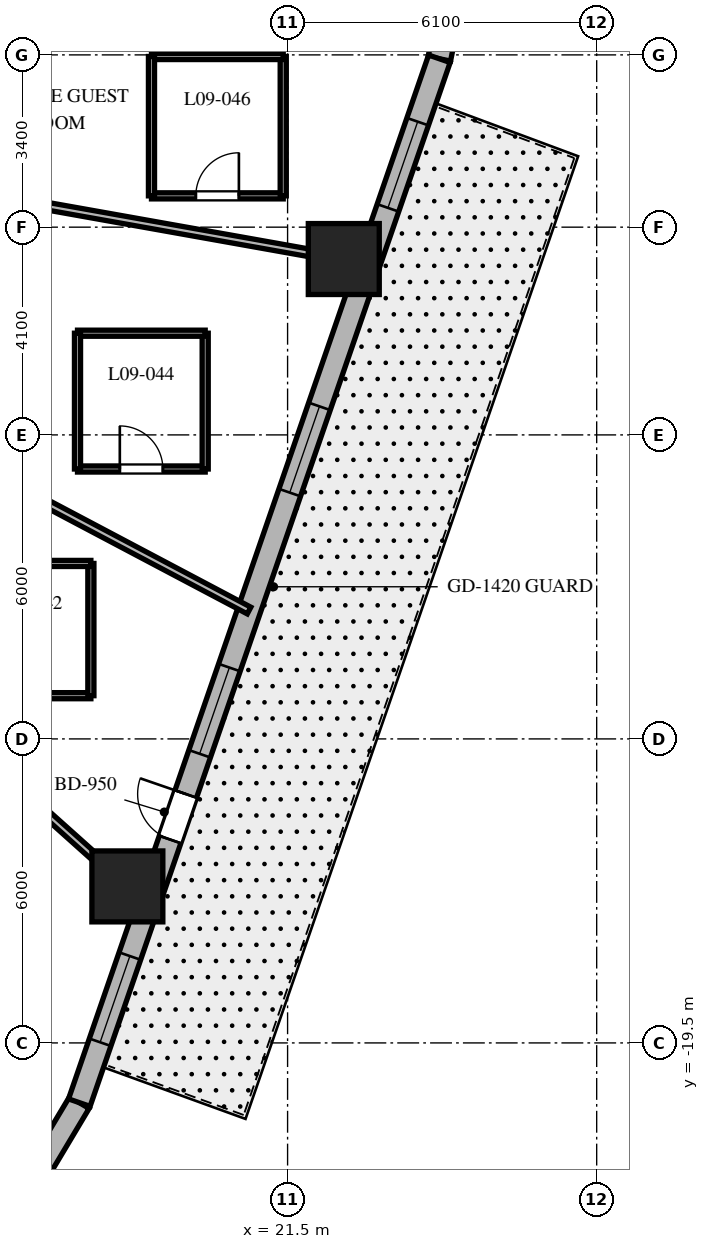
"""IFC4 building model, lengths in metres.
Left out: names, types, materials, properties, quantities, classifications, styles, units other than length and angle.
Written with IfcOpenShell. Run it as: python <this file> out.ifc"""

import sys

from ifc_helpers import new_model, si_unit, direction, frame, frame_2d, origin, origin_2d, place, context, subcontext, project, spatial, rectangle, extrude, element, fill, save


model = new_model("IFC4")
c1 = context("Model", 3, precision=1e-05, world=origin(), true_north=direction((0.0, 1.0)))
c2 = subcontext(c1, "Body", "Model", "MODEL_VIEW")
j1 = project(units=[si_unit("LENGTHUNIT", "METRE"), si_unit("PLANEANGLEUNIT", "RADIAN")], contexts=[c1])
p1 = place(None, origin())
s1 = spatial("IfcSite", under=j1, at=p1, CompositionType="ELEMENT")
p2 = place(p1, origin())
s2 = spatial("IfcBuilding", under=s1, at=p2, CompositionType="ELEMENT")
p3 = place(p2, frame((0.0, 0.0, 45.3)))
s3 = spatial("IfcBuildingStorey", under=s2, at=p3, CompositionType="ELEMENT", Elevation=45.3)
for number, where, z_axis, x_axis in (
    (1, (18.338, -16.411, 0.0), (0.0, 0.0, 1.0), (1.0, 0.0, 0.0)),
    (2, (22.609, -4.029, 0.0), (0.0, 0.0, 1.0), (1.0, 0.0, 0.0)),
):
    element("IfcColumn", number, at=place(p3, frame(where, z_axis=z_axis, x_axis=x_axis)), inside=s3, PredefinedType="COLUMN", context=c2, shape_type="SweptSolid", body=[
        extrude(rectangle(XDim=1.4, YDim=1.4, at=origin_2d()), origin(), (0.0, 0.0, 1.0), 3.7),
    ])
p4 = place(p3, frame((16.669, -21.885, 0.0), z_axis=(0.0, 0.0, 1.0), x_axis=(0.512936712947, 0.858426425799, 0.0)))
e3 = element("IfcWall", 3, at=p4, inside=s3, PredefinedType="SOLIDWALL", context=c2, shape_type="SweptSolid", body=[
    extrude(rectangle(XDim=1.406, YDim=0.45, at=frame_2d((0.703, 0.0))), origin(), (0.0, 0.0, 1.0), 3.4),
])
p5 = place(p3, frame((24.496, -0.077, 0.0), z_axis=(0.0, 0.0, 1.0), x_axis=(0.199570594521, 0.979883451132, 0.0)))
e4 = element("IfcWall", 4, at=p5, inside=s3, PredefinedType="SOLIDWALL", context=c2, shape_type="SweptSolid", body=[
    extrude(rectangle(XDim=0.897, YDim=0.45, at=frame_2d((0.448, 0.0))), origin(), (0.0, 0.0, 1.0), 3.4),
])
p6 = place(p3, frame((17.39, -20.678, 0.0), z_axis=(0.0, 0.0, 1.0), x_axis=(0.326068018294, 0.945346310854, 0.0)))
e5 = element("IfcWall", 5, at=p6, inside=s3, PredefinedType="SOLIDWALL", context=c2, shape_type="SweptSolid", body=[
    extrude(rectangle(XDim=21.793, YDim=0.45, at=frame_2d((10.896, 0.0))), origin(), (0.0, 0.0, 1.0), 3.4),
])
p7 = place(p6, frame((5.493, 0.0, 0.0)))
e6 = element("IfcOpeningElement", 6, at=p7, cuts=e5, PredefinedType="OPENING", context=c2, shape_type="SweptSolid", body=[
    extrude(rectangle(XDim=0.95, YDim=2.15, at=frame_2d((0.475, 1.075))), frame((0.0, 0.235, 0.0), z_axis=(0.0, -1.0, 0.0), x_axis=(1.0, 0.0, 0.0)), (0.0, 0.0, 1.0), 0.47),
])
p8 = place(p6, frame((1.26, 0.0, 0.8)))
e7 = element("IfcOpeningElement", 7, at=p8, cuts=e5, PredefinedType="OPENING", context=c2, shape_type="SweptSolid", body=[
    extrude(rectangle(XDim=1.8, YDim=1.8, at=frame_2d((0.9, 0.9))), frame((0.0, 0.235, 0.0), z_axis=(0.0, -1.0, 0.0), x_axis=(1.0, 0.0, 0.0)), (0.0, 0.0, 1.0), 0.47),
])
p9 = place(p6, frame((7.283, 0.0, 0.8)))
e8 = element("IfcOpeningElement", 8, at=p9, cuts=e5, PredefinedType="OPENING", context=c2, shape_type="SweptSolid", body=[
    extrude(rectangle(XDim=1.8, YDim=1.8, at=frame_2d((0.9, 0.9))), frame((0.0, 0.235, 0.0), z_axis=(0.0, -1.0, 0.0), x_axis=(1.0, 0.0, 0.0)), (0.0, 0.0, 1.0), 0.47),
])
p10 = place(p6, frame((12.736, 0.0, 0.8)))
e9 = element("IfcOpeningElement", 9, at=p10, cuts=e5, PredefinedType="OPENING", context=c2, shape_type="SweptSolid", body=[
    extrude(rectangle(XDim=1.8, YDim=1.8, at=frame_2d((0.9, 0.9))), frame((0.0, 0.235, 0.0), z_axis=(0.0, -1.0, 0.0), x_axis=(1.0, 0.0, 0.0)), (0.0, 0.0, 1.0), 0.47),
])
p11 = place(p6, frame((18.68, 0.0, 0.8)))
e10 = element("IfcOpeningElement", 10, at=p11, cuts=e5, PredefinedType="OPENING", context=c2, shape_type="SweptSolid", body=[
    extrude(rectangle(XDim=1.8, YDim=1.8, at=frame_2d((0.9, 0.9))), frame((0.0, 0.235, 0.0), z_axis=(0.0, -1.0, 0.0), x_axis=(1.0, 0.0, 0.0)), (0.0, 0.0, 1.0), 0.47),
])
p12 = place(p3, frame((11.007, -9.85, 0.0), z_axis=(0.0, 0.0, 1.0), x_axis=(0.745177305978, -0.666866390407, 0.0)))
e11 = element("IfcWall", 11, at=p12, inside=s3, PredefinedType="PARTITIONING", context=c2, shape_type="SweptSolid", body=[
    extrude(rectangle(XDim=10.375, YDim=0.15, at=frame_2d((5.188, 0.0))), origin(), (0.0, 0.0, 1.0), 2.54),
])
p13 = place(p3, frame((11.35, -6.001, 0.0), z_axis=(0.0, 0.0, 1.0), x_axis=(0.884022077319, -0.467445148453, 0.0)))
e12 = element("IfcWall", 12, at=p13, inside=s3, PredefinedType="PARTITIONING", context=c2, shape_type="SweptSolid", body=[
    extrude(rectangle(XDim=10.621, YDim=0.15, at=frame_2d((5.311, 0.0))), origin(), (0.0, 0.0, 1.0), 2.54),
])
p14 = place(p3, frame((11.35, -2.023, 0.0), z_axis=(0.0, 0.0, 1.0), x_axis=(0.984493741877, -0.17541970301, 0.0)))
e13 = element("IfcWall", 13, at=p14, inside=s3, PredefinedType="PARTITIONING", context=c2, shape_type="SweptSolid", body=[
    extrude(rectangle(XDim=11.937, YDim=0.15, at=frame_2d((5.969, 0.0))), origin(), (0.0, 0.0, 1.0), 2.54),
])
p15 = place(p3, frame((15.178, -12.647, 0.0), z_axis=(0.0, 0.0, 1.0), x_axis=(1.0, 0.0, 0.0)))
e14 = element("IfcWall", 14, at=p15, inside=s3, PredefinedType="PARTITIONING", context=c2, shape_type="SweptSolid", body=[
    extrude(rectangle(XDim=2.44, YDim=0.12, at=frame_2d((1.22, 0.0))), origin(), (0.0, 0.0, 1.0), 2.972),
])
p16 = place(p15, frame((0.795, 0.0, 0.0)))
e15 = element("IfcOpeningElement", 15, at=p16, cuts=e14, PredefinedType="OPENING", context=c2, shape_type="SweptSolid", body=[
    extrude(rectangle(XDim=0.85, YDim=2.03, at=frame_2d((0.425, 1.015))), frame((0.0, 0.07, 0.0), z_axis=(0.0, -1.0, 0.0), x_axis=(1.0, 0.0, 0.0)), (0.0, 0.0, 1.0), 0.14),
])
p17 = place(p3, frame((17.618, -12.647, 0.0), z_axis=(0.0, 0.0, 1.0), x_axis=(0.0, 1.0, 0.0)))
e16 = element("IfcWall", 16, at=p17, inside=s3, PredefinedType="PARTITIONING", context=c2, shape_type="SweptSolid", body=[
    extrude(rectangle(XDim=2.61, YDim=0.12, at=frame_2d((1.305, 0.0))), origin(), (0.0, 0.0, 1.0), 3.4),
])
p18 = place(p3, frame((17.618, -10.037, 0.0), z_axis=(0.0, 0.0, 1.0), x_axis=(-1.0, 0.0, 0.0)))
e17 = element("IfcWall", 17, at=p18, inside=s3, PredefinedType="PARTITIONING", context=c2, shape_type="SweptSolid", body=[
    extrude(rectangle(XDim=2.44, YDim=0.12, at=frame_2d((1.22, 0.0))), origin(), (0.0, 0.0, 1.0), 2.972),
])
p19 = place(p3, frame((17.354, -8.173, 0.0), z_axis=(0.0, 0.0, 1.0), x_axis=(1.0, 0.0, 0.0)))
e18 = element("IfcWall", 18, at=p19, inside=s3, PredefinedType="PARTITIONING", context=c2, shape_type="SweptSolid", body=[
    extrude(rectangle(XDim=2.52, YDim=0.12, at=frame_2d((1.26, 0.0))), origin(), (0.0, 0.0, 1.0), 3.4),
])
p20 = place(p19, frame((0.835, 0.0, 0.0)))
e19 = element("IfcOpeningElement", 19, at=p20, cuts=e18, PredefinedType="OPENING", context=c2, shape_type="SweptSolid", body=[
    extrude(rectangle(XDim=0.85, YDim=2.03, at=frame_2d((0.425, 1.015))), frame((0.0, 0.07, 0.0), z_axis=(0.0, -1.0, 0.0), x_axis=(1.0, 0.0, 0.0)), (0.0, 0.0, 1.0), 0.14),
])
p21 = place(p3, frame((19.874, -8.173, 0.0), z_axis=(0.0, 0.0, 1.0), x_axis=(0.0, 1.0, 0.0)))
e20 = element("IfcWall", 20, at=p21, inside=s3, PredefinedType="PARTITIONING", context=c2, shape_type="SweptSolid", body=[
    extrude(rectangle(XDim=2.68, YDim=0.12, at=frame_2d((1.34, 0.0))), origin(), (0.0, 0.0, 1.0), 3.4),
])
p22 = place(p3, frame((19.874, -5.493, 0.0), z_axis=(0.0, 0.0, 1.0), x_axis=(-1.0, 0.0, 0.0)))
e21 = element("IfcWall", 21, at=p22, inside=s3, PredefinedType="PARTITIONING", context=c2, shape_type="SweptSolid", body=[
    extrude(rectangle(XDim=2.52, YDim=0.12, at=frame_2d((1.26, 0.0))), origin(), (0.0, 0.0, 1.0), 2.84),
])
p23 = place(p3, frame((17.354, -5.493, 0.0), z_axis=(0.0, 0.0, 1.0), x_axis=(0.0, -1.0, 0.0)))
e22 = element("IfcWall", 22, at=p23, inside=s3, PredefinedType="PARTITIONING", context=c2, shape_type="SweptSolid", body=[
    extrude(rectangle(XDim=2.68, YDim=0.12, at=frame_2d((1.34, 0.0))), origin(), (0.0, 0.0, 1.0), 2.972),
])
p24 = place(p3, frame((18.814, -2.782, 0.0), z_axis=(0.0, 0.0, 1.0), x_axis=(1.0, 0.0, 0.0)))
e23 = element("IfcWall", 23, at=p24, inside=s3, PredefinedType="PARTITIONING", context=c2, shape_type="SweptSolid", body=[
    extrude(rectangle(XDim=2.6, YDim=0.12, at=frame_2d((1.3, 0.0))), origin(), (0.0, 0.0, 1.0), 3.4),
])
p25 = place(p24, frame((0.875, 0.0, 0.0)))
e24 = element("IfcOpeningElement", 24, at=p25, cuts=e23, PredefinedType="OPENING", context=c2, shape_type="SweptSolid", body=[
    extrude(rectangle(XDim=0.85, YDim=2.03, at=frame_2d((0.425, 1.015))), frame((0.0, 0.07, 0.0), z_axis=(0.0, -1.0, 0.0), x_axis=(1.0, 0.0, 0.0)), (0.0, 0.0, 1.0), 0.14),
])
p26 = place(p3, frame((21.414, -2.782, 0.0), z_axis=(0.0, 0.0, 1.0), x_axis=(0.0, 1.0, 0.0)))
e25 = element("IfcWall", 25, at=p26, inside=s3, PredefinedType="PARTITIONING", context=c2, shape_type="SweptSolid", body=[
    extrude(rectangle(XDim=2.75, YDim=0.12, at=frame_2d((1.375, 0.0))), origin(), (0.0, 0.0, 1.0), 3.4),
])
p27 = place(p3, frame((21.414, -0.032, 0.0), z_axis=(0.0, 0.0, 1.0), x_axis=(-1.0, 0.0, 0.0)))
e26 = element("IfcWall", 26, at=p27, inside=s3, PredefinedType="PARTITIONING", context=c2, shape_type="SweptSolid", body=[
    extrude(rectangle(XDim=2.6, YDim=0.12, at=frame_2d((1.3, 0.0))), origin(), (0.0, 0.0, 1.0), 3.4),
])
p28 = place(p3, frame((18.814, -0.032, 0.0), z_axis=(0.0, 0.0, 1.0), x_axis=(0.0, -1.0, 0.0)))
e27 = element("IfcWall", 27, at=p28, inside=s3, PredefinedType="PARTITIONING", context=c2, shape_type="SweptSolid", body=[
    extrude(rectangle(XDim=2.75, YDim=0.12, at=frame_2d((1.375, 0.0))), origin(), (0.0, 0.0, 1.0), 3.4),
])
p29 = place(p7, origin())
e28 = element("IfcDoor", 28, at=p29, inside=s3, OperationType="SINGLE_SWING_RIGHT", PredefinedType="DOOR", context=c2, shape_type="SweptSolid", body=[
    extrude(rectangle(XDim=0.95, YDim=2.15, at=frame_2d((0.475, 1.075))), frame((0.0, 0.025, 0.0), z_axis=(0.0, -1.0, 0.0), x_axis=(1.0, 0.0, 0.0)), (0.0, 0.0, 1.0), 0.05),
])
fill(e6, e28)
p30 = place(p8, origin())
e29 = element("IfcWindow", 29, at=p30, inside=s3, PartitioningType="SINGLE_PANEL", PredefinedType="WINDOW", context=c2, shape_type="SweptSolid", body=[
    extrude(rectangle(XDim=1.8, YDim=1.8, at=frame_2d((0.9, 0.9))), frame((0.0, 0.03, 0.0), z_axis=(0.0, -1.0, 0.0), x_axis=(1.0, 0.0, 0.0)), (0.0, 0.0, 1.0), 0.06),
])
fill(e7, e29)
p31 = place(p9, origin())
e30 = element("IfcWindow", 30, at=p31, inside=s3, PartitioningType="SINGLE_PANEL", PredefinedType="WINDOW", context=c2, shape_type="SweptSolid", body=[
    extrude(rectangle(XDim=1.8, YDim=1.8, at=frame_2d((0.9, 0.9))), frame((0.0, 0.03, 0.0), z_axis=(0.0, -1.0, 0.0), x_axis=(1.0, 0.0, 0.0)), (0.0, 0.0, 1.0), 0.06),
])
fill(e8, e30)
p32 = place(p10, origin())
e31 = element("IfcWindow", 31, at=p32, inside=s3, PartitioningType="SINGLE_PANEL", PredefinedType="WINDOW", context=c2, shape_type="SweptSolid", body=[
    extrude(rectangle(XDim=1.8, YDim=1.8, at=frame_2d((0.9, 0.9))), frame((0.0, 0.03, 0.0), z_axis=(0.0, -1.0, 0.0), x_axis=(1.0, 0.0, 0.0)), (0.0, 0.0, 1.0), 0.06),
])
fill(e9, e31)
p33 = place(p11, origin())
e32 = element("IfcWindow", 32, at=p33, inside=s3, PartitioningType="SINGLE_PANEL", PredefinedType="WINDOW", context=c2, shape_type="SweptSolid", body=[
    extrude(rectangle(XDim=1.8, YDim=1.8, at=frame_2d((0.9, 0.9))), frame((0.0, 0.03, 0.0), z_axis=(0.0, -1.0, 0.0), x_axis=(1.0, 0.0, 0.0)), (0.0, 0.0, 1.0), 0.06),
])
fill(e10, e32)
p34 = place(p20, origin())
e33 = element("IfcDoor", 33, at=p34, inside=s3, OperationType="SINGLE_SWING_LEFT", PredefinedType="DOOR", context=c2, shape_type="SweptSolid", body=[
    extrude(rectangle(XDim=0.85, YDim=2.03, at=frame_2d((0.425, 1.015))), frame((0.0, 0.025, 0.0), z_axis=(0.0, -1.0, 0.0), x_axis=(1.0, 0.0, 0.0)), (0.0, 0.0, 1.0), 0.05),
])
fill(e19, e33)
p35 = place(p25, origin())
e34 = element("IfcDoor", 34, at=p35, inside=s3, OperationType="SINGLE_SWING_RIGHT", PredefinedType="DOOR", context=c2, shape_type="SweptSolid", body=[
    extrude(rectangle(XDim=0.85, YDim=2.03, at=frame_2d((0.425, 1.015))), frame((0.0, 0.025, 0.0), z_axis=(0.0, -1.0, 0.0), x_axis=(1.0, 0.0, 0.0)), (0.0, 0.0, 1.0), 0.05),
])
fill(e24, e34)
save(model, sys.argv[1])
